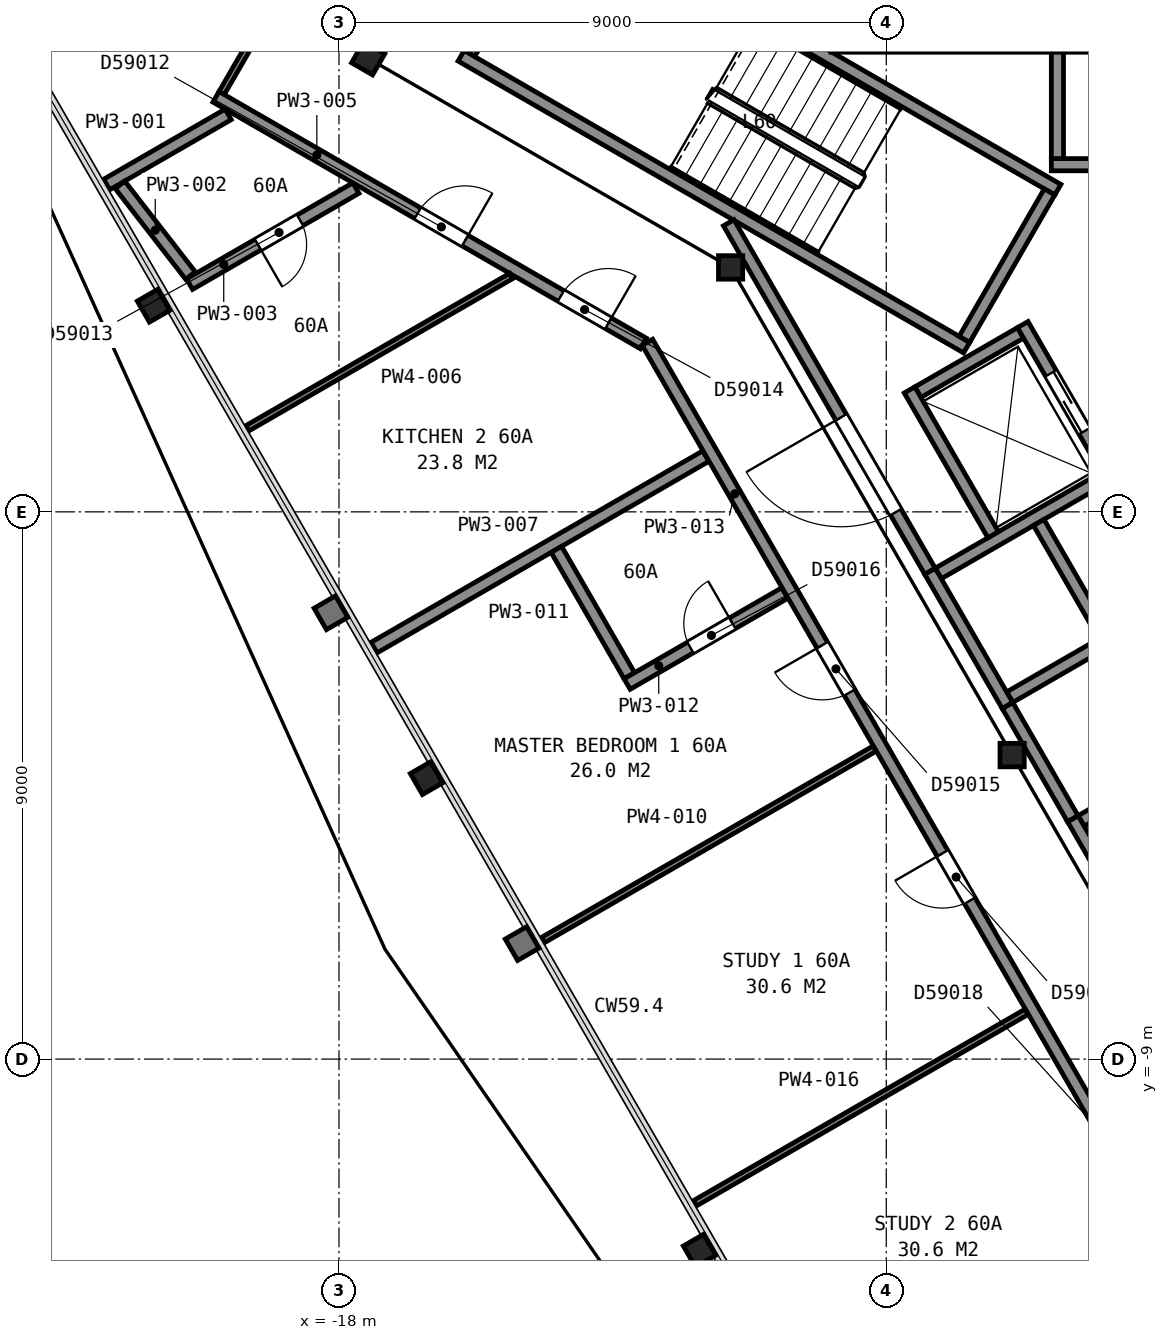
"""IFC4 building model, lengths in metres.
Left out: names, types, materials, properties, quantities, classifications, styles, units other than length and angle.
Written with IfcOpenShell. Run it as: python <this file> out.ifc"""

import sys

from ifc_helpers import new_model, si_unit, direction, frame, frame_2d, origin, origin_2d, place, context, subcontext, project, spatial, rectangle, i_section, extrude, element, fill, save


model = new_model("IFC4")
c1 = context("Model", 3, precision=1e-05, world=origin(), true_north=direction((0.0, 1.0)))
c2 = subcontext(c1, "Body", "Model", "MODEL_VIEW")
j1 = project(units=[si_unit("LENGTHUNIT", "METRE"), si_unit("PLANEANGLEUNIT", "RADIAN")], contexts=[c1])
p1 = place(None, origin())
s1 = spatial("IfcSite", under=j1, at=p1, CompositionType="ELEMENT")
p2 = place(p1, origin())
s2 = spatial("IfcBuilding", under=s1, at=p2, CompositionType="ELEMENT")
p3 = place(p2, frame((0.0, 0.0, 239.7)))
s3 = spatial("IfcBuildingStorey", under=s2, at=p3, CompositionType="ELEMENT", Elevation=239.7)
for number, where, z_axis, x_axis in (
    (1, (-21.05, 3.39, 0.0), (0.0, 0.0, 1.0), (-0.5, 0.866, 0.0)),
    (2, (-16.56, -4.38, 0.0), (0.0, 0.0, 1.0), (-0.5, 0.866, 0.0)),
    (3, (-12.07, -12.15, 0.0), (0.0, 0.0, 1.0), (-0.5, 0.866, 0.0)),
):
    element("IfcColumn", number, at=place(p3, frame(where, z_axis=z_axis, x_axis=x_axis)), inside=s3, PredefinedType="COLUMN", context=c2, shape_type="SweptSolid", body=[
        extrude(i_section(OverallWidth=0.399, OverallDepth=0.386, WebThickness=0.021, FlangeThickness=0.033, FilletRadius=0.015, at=origin_2d()), origin(), (0.0, 0.0, 1.0), 3.665),
    ])
p4 = place(p3, frame((-17.52, 7.46, 0.0), z_axis=(0.0, 0.0, 1.0), x_axis=(0.5, 0.866025403784, 0.0)))
e4 = element("IfcColumn", 4, at=p4, inside=s3, PredefinedType="COLUMN", context=c2, shape_type="SweptSolid", body=[
    extrude(i_section(OverallWidth=0.401, OverallDepth=0.399, WebThickness=0.025, FlangeThickness=0.04, FilletRadius=0.015, at=origin_2d()), origin(), (0.0, 0.0, 1.0), 3.7),
])
for number, where, z_axis, x_axis in (
    (5, (-11.56, 4.02, 0.0), (0.0, 0.0, 1.0), (1.0, 0.0, 0.0)),
    (6, (-6.93, -4.0, 0.0), (0.0, 0.0, 1.0), (1.0, 0.0, 0.0)),
):
    element("IfcColumn", number, at=place(p3, frame(where, z_axis=z_axis, x_axis=x_axis)), inside=s3, PredefinedType="COLUMN", context=c2, shape_type="SweptSolid", body=[
        extrude(i_section(OverallWidth=0.399, OverallDepth=0.386, WebThickness=0.021, FlangeThickness=0.033, FilletRadius=0.015, at=origin_2d()), origin(), (0.0, 0.0, 1.0), 3.7),
    ])
p5 = place(p3, frame((-14.455, 9.962, 0.0), z_axis=(0.0, 0.0, 1.0), x_axis=(-0.500049511043, -0.865996816683, 0.0)))
e7 = element("IfcWall", 7, at=p5, inside=s3, PredefinedType="PARTITIONING", context=c2, shape_type="SweptSolid", body=[
    extrude(rectangle(XDim=2.8, YDim=0.2, at=frame_2d((1.4, 0.0))), origin(), (0.0, 0.0, 1.0), 3.45),
])
p6 = place(p5, frame((0.85, 0.0, 0.0)))
e8 = element("IfcOpeningElement", 8, at=p6, cuts=e7, PredefinedType="OPENING", context=c2, shape_type="SweptSolid", body=[
    extrude(rectangle(XDim=1.1, YDim=2.1, at=frame_2d((0.55, 1.05))), frame((0.0, 0.11, 0.0), z_axis=(0.0, -1.0, 0.0), x_axis=(1.0, 0.0, 0.0)), (0.0, 0.0, 1.0), 0.22),
])
for number, where, z_axis, x_axis in (
    (9, (-7.678, 2.701, 0.0), (0.0, 0.0, 1.0), (-0.866, 0.5, 0.0)),
    (10, (-6.178, 5.299, 0.0), (0.0, 0.0, 1.0), (-0.866, 0.5, 0.0)),
):
    element("IfcWall", number, at=place(p3, frame(where, z_axis=z_axis, x_axis=x_axis)), inside=s3, PredefinedType="PARTITIONING", context=c2, shape_type="SweptSolid", body=[
        extrude(rectangle(XDim=9.6, YDim=0.2, at=frame_2d((4.8, 0.0))), origin(), (0.0, 0.0, 1.0), 3.45),
    ])
p7 = place(p3, frame((-6.315, 5.262, 0.0), z_axis=(0.0, 0.0, 1.0), x_axis=(-0.500049511043, -0.865996816683, 0.0)))
e11 = element("IfcWall", 11, at=p7, inside=s3, PredefinedType="PARTITIONING", context=c2, shape_type="SweptSolid", body=[
    extrude(rectangle(XDim=2.8, YDim=0.2, at=frame_2d((1.4, 0.0))), origin(), (0.0, 0.0, 1.0), 3.45),
])
for number, where, z_axis, x_axis in (
    (12, (-6.285, 5.71, 0.0), (0.0, 0.0, 1.0), (1.0, 0.0, 0.0)),
    (13, (-6.285, 7.66, 0.0), (0.0, 0.0, 1.0), (1.0, 0.0, 0.0)),
):
    element("IfcWall", number, at=place(p3, frame(where, z_axis=z_axis, x_axis=x_axis)), inside=s3, PredefinedType="PARTITIONING", context=c2, shape_type="SweptSolid", body=[
        extrude(rectangle(XDim=2.35, YDim=0.2, at=frame_2d((1.175, 0.0))), origin(), (0.0, 0.0, 1.0), 3.7),
    ])
for number, where, z_axis, x_axis in (
    (14, (-5.795, -5.083, 0.0), (0.0, 0.0, 1.0), (0.866, 0.5, 0.0)),
    (15, (-6.97, -3.048, 0.0), (0.0, 0.0, 1.0), (0.866, 0.5, 0.0)),
):
    element("IfcWall", number, at=place(p3, frame(where, z_axis=z_axis, x_axis=x_axis)), inside=s3, PredefinedType="PARTITIONING", context=c2, shape_type="SweptSolid", body=[
        extrude(rectangle(XDim=1.75, YDim=0.2, at=frame_2d((0.875, 0.0))), origin(), (0.0, 0.0, 1.0), 3.7),
    ])
p8 = place(p3, frame((-8.145, -1.013, 0.0), z_axis=(0.0, 0.0, 1.0), x_axis=(0.866016494683, 0.500015430699, 0.0)))
e16 = element("IfcWall", 16, at=p8, inside=s3, PredefinedType="PARTITIONING", context=c2, shape_type="SweptSolid", body=[
    extrude(rectangle(XDim=3.15, YDim=0.2, at=frame_2d((1.575, 0.0))), origin(), (0.0, 0.0, 1.0), 3.7),
])
p9 = place(p3, frame((-8.48, 1.969, 0.0), z_axis=(0.0, 0.0, 1.0), x_axis=(0.866000020948, 0.500043961785, 0.0)))
e17 = element("IfcWall", 17, at=p9, inside=s3, PredefinedType="PARTITIONING", context=c2, shape_type="SweptSolid", body=[
    extrude(rectangle(XDim=1.95, YDim=0.2, at=frame_2d((0.975, 0.0))), origin(), (0.0, 0.0, 1.0), 3.7),
])
p10 = place(p3, frame((-6.185, 5.81, 0.0), z_axis=(0.0, 0.0, 1.0), x_axis=(0.0, 1.0, 0.0)))
e18 = element("IfcWall", 18, at=p10, inside=s3, PredefinedType="PARTITIONING", context=c2, shape_type="SweptSolid", body=[
    extrude(rectangle(XDim=1.75, YDim=0.2, at=frame_2d((0.875, 0.0))), origin(), (0.0, 0.0, 1.0), 3.7),
])
p11 = place(p3, frame((-5.28, 0.525, 0.0), z_axis=(0.0, 0.0, 1.0), x_axis=(-0.500037662692, 0.866003658127, 0.0)))
e19 = element("IfcWall", 19, at=p11, inside=s3, PredefinedType="PARTITIONING", context=c2, shape_type="SweptSolid", body=[
    extrude(rectangle(XDim=2.95, YDim=0.2, at=frame_2d((1.475, 0.0))), origin(), (0.0, 0.0, 1.0), 3.7),
])
p12 = place(p11, frame((0.925, 0.0, 0.0)))
e20 = element("IfcOpeningElement", 20, at=p12, cuts=e19, PredefinedType="OPENING", context=c2, shape_type="SweptSolid", body=[
    extrude(rectangle(XDim=1.1, YDim=2.1, at=frame_2d((0.55, 1.05))), frame((0.0, 0.11, 0.0), z_axis=(0.0, -1.0, 0.0), x_axis=(1.0, 0.0, 0.0)), (0.0, 0.0, 1.0), 0.22),
])
p13 = place(p3, frame((-5.318, -2.21, 0.0), z_axis=(0.0, 0.0, 1.0), x_axis=(-0.499938297808, 0.866061024631, 0.0)))
e21 = element("IfcWall", 21, at=p13, inside=s3, PredefinedType="PARTITIONING", context=c2, shape_type="SweptSolid", body=[
    extrude(rectangle(XDim=2.35, YDim=0.2, at=frame_2d((1.175, 0.0))), origin(), (0.0, 0.0, 1.0), 3.7),
])
p14 = place(p3, frame((-7.242, -0.376, 0.0), z_axis=(0.0, 0.0, 1.0), x_axis=(-0.499996545922, 0.866027397988, 0.0)))
e22 = element("IfcWall", 22, at=p14, inside=s3, PredefinedType="PARTITIONING", context=c2, shape_type="SweptSolid", body=[
    extrude(rectangle(XDim=2.75, YDim=0.2, at=frame_2d((1.375, 0.0))), origin(), (0.0, 0.0, 1.0), 3.7),
])
for number, where, z_axis, x_axis in (
    (23, (-4.656, -7.255, 0.0), (0.0, 0.0, 1.0), (-0.5, 0.866, 0.0)),
    (24, (-7.006, -3.185, 0.0), (0.0, 0.0, 1.0), (-0.5, 0.866, 0.0)),
):
    element("IfcWall", number, at=place(p3, frame(where, z_axis=z_axis, x_axis=x_axis)), inside=s3, PredefinedType="PARTITIONING", context=c2, shape_type="SweptSolid", body=[
        extrude(rectangle(XDim=2.55, YDim=0.2, at=frame_2d((1.275, 0.0))), origin(), (0.0, 0.0, 1.0), 3.7),
    ])
p15 = place(p3, frame((-11.591, 4.755, 0.0), z_axis=(0.0, 0.0, 1.0), x_axis=(0.500043977787, -0.866000011708, 0.0)))
e25 = element("IfcWall", 25, at=p15, inside=s3, PredefinedType="PARTITIONING", context=c2, shape_type="SweptSolid", body=[
    extrude(rectangle(XDim=6.617, YDim=0.2, at=frame_2d((3.308, 0.0))), origin(), (0.0, 0.0, 1.0), 3.45),
])
p16 = place(p15, frame((3.695, 0.0, 0.0)))
e26 = element("IfcOpeningElement", 26, at=p16, cuts=e25, PredefinedType="OPENING", context=c2, shape_type="SweptSolid", body=[
    extrude(rectangle(XDim=1.8, YDim=2.1, at=frame_2d((0.9, 1.05))), frame((0.0, 0.11, 0.0), z_axis=(0.0, -1.0, 0.0), x_axis=(1.0, 0.0, 0.0)), (0.0, 0.0, 1.0), 0.22),
])
p17 = place(p3, frame((-9.908, 7.66, 0.0), z_axis=(0.0, 0.0, 1.0), x_axis=(1.0, 0.0, 0.0)))
e27 = element("IfcWall", 27, at=p17, inside=s3, PredefinedType="PARTITIONING", context=c2, shape_type="SweptSolid", body=[
    extrude(rectangle(XDim=3.621, YDim=0.2, at=frame_2d((1.811, 0.0))), origin(), (0.0, 0.0, 1.0), 3.45),
])
p18 = place(p3, frame((-7.005, -3.187, 0.0), z_axis=(0.0, 0.0, 1.0), x_axis=(0.499689606989, -0.866204535123, 0.0)))
e28 = element("IfcWall", 28, at=p18, inside=s3, PredefinedType="PARTITIONING", context=c2, shape_type="SweptSolid", body=[
    extrude(rectangle(XDim=2.145, YDim=0.2, at=frame_2d((1.072, 0.0))), origin(), (0.0, 0.0, 1.0), 3.45),
])
p19 = place(p3, frame((-21.821, 5.384, 0.0), z_axis=(0.0, 0.0, 1.0), x_axis=(0.866178541367, 0.499734664072, 0.0)))
e29 = element("IfcWall", 29, at=p19, inside=s3, PredefinedType="PARTITIONING", context=c2, shape_type="SweptSolid", body=[
    extrude(rectangle(XDim=2.308, YDim=0.2, at=frame_2d((1.154, 0.0))), origin(), (0.0, 0.0, 1.0), 2.713),
])
p20 = place(p3, frame((-21.602, 5.378, 0.0), z_axis=(0.0, 0.0, 1.0), x_axis=(0.613269592497, -0.789873665163, 0.0)))
e30 = element("IfcWall", 30, at=p20, inside=s3, PredefinedType="PARTITIONING", context=c2, shape_type="SweptSolid", body=[
    extrude(rectangle(XDim=1.89, YDim=0.2, at=frame_2d((0.945, 0.0))), origin(), (0.0, 0.0, 1.0), 2.713),
])
p21 = place(p3, frame((-20.458, 3.745, 0.0), z_axis=(0.0, 0.0, 1.0), x_axis=(0.865942402911, 0.500143734182, 0.0)))
e31 = element("IfcWall", 31, at=p21, inside=s3, PredefinedType="PARTITIONING", context=c2, shape_type="SweptSolid", body=[
    extrude(rectangle(XDim=3.16, YDim=0.2, at=frame_2d((1.58, 0.0))), origin(), (0.0, 0.0, 1.0), 2.713),
])
p22 = place(p21, frame((1.3, 0.0, 0.0)))
e32 = element("IfcOpeningElement", 32, at=p22, cuts=e31, PredefinedType="OPENING", context=c2, shape_type="SweptSolid", body=[
    extrude(rectangle(XDim=0.8, YDim=2.1, at=frame_2d((0.4, 1.05))), frame((0.0, 0.11, 0.0), z_axis=(0.0, -1.0, 0.0), x_axis=(1.0, 0.0, 0.0)), (0.0, 0.0, 1.0), 0.22),
])
p23 = place(p3, frame((-19.93, 6.888, 0.0), z_axis=(0.0, 0.0, 1.0), x_axis=(0.500420003794, 0.865782778648, 0.0)))
e33 = element("IfcWall", 33, at=p23, inside=s3, PredefinedType="PARTITIONING", context=c2, shape_type="SweptSolid", body=[
    extrude(rectangle(XDim=7.997, YDim=0.1, at=frame_2d((3.999, 0.0))), origin(), (0.0, 0.0, 1.0), 2.713),
])
p24 = place(p23, frame((3.4, 0.0, 0.0)))
e34 = element("IfcOpeningElement", 34, at=p24, cuts=e33, PredefinedType="OPENING", context=c2, shape_type="SweptSolid", body=[
    extrude(rectangle(XDim=1.2, YDim=2.1, at=frame_2d((0.6, 1.05))), frame((0.0, 0.06, 0.0), z_axis=(0.0, -1.0, 0.0), x_axis=(1.0, 0.0, 0.0)), (0.0, 0.0, 1.0), 0.12),
])
p25 = place(p3, frame((-12.995, 2.77, 0.0), z_axis=(0.0, 0.0, 1.0), x_axis=(-0.866100425926, 0.499870035319, 0.0)))
e35 = element("IfcWall", 35, at=p25, inside=s3, PredefinedType="PARTITIONING", context=c2, shape_type="SweptSolid", body=[
    extrude(rectangle(XDim=8.115, YDim=0.2, at=frame_2d((4.058, 0.0))), origin(), (0.0, 0.0, 1.0), 2.713),
])
p26 = place(p25, frame((3.385, 0.0, 0.0)))
e36 = element("IfcOpeningElement", 36, at=p26, cuts=e35, PredefinedType="OPENING", context=c2, shape_type="SweptSolid", body=[
    extrude(rectangle(XDim=0.9, YDim=2.1, at=frame_2d((0.45, 1.05))), frame((0.0, 0.11, 0.0), z_axis=(0.0, -1.0, 0.0), x_axis=(1.0, 0.0, 0.0)), (0.0, 0.0, 1.0), 0.22),
])
p27 = place(p25, frame((0.665, 0.0, 0.0)))
e37 = element("IfcOpeningElement", 37, at=p27, cuts=e35, PredefinedType="OPENING", context=c2, shape_type="SweptSolid", body=[
    extrude(rectangle(XDim=0.9, YDim=2.1, at=frame_2d((0.45, 1.05))), frame((0.0, 0.11, 0.0), z_axis=(0.0, -1.0, 0.0), x_axis=(1.0, 0.0, 0.0)), (0.0, 0.0, 1.0), 0.22),
])
p28 = place(p3, frame((-19.507, 1.375, 0.0), z_axis=(0.0, 0.0, 1.0), x_axis=(0.86604843891, 0.499960099869, 0.0)))
e38 = element("IfcWall", 38, at=p28, inside=s3, PredefinedType="PARTITIONING", context=c2, shape_type="SweptSolid", body=[
    extrude(rectangle(XDim=5.01, YDim=0.1, at=frame_2d((2.505, 0.0))), origin(), (0.0, 0.0, 1.0), 2.713),
])
p29 = place(p3, frame((-17.423, -2.233, 0.0), z_axis=(0.0, 0.0, 1.0), x_axis=(0.866040369504, 0.499974077718, 0.0)))
e39 = element("IfcWall", 39, at=p29, inside=s3, PredefinedType="PARTITIONING", context=c2, shape_type="SweptSolid", body=[
    extrude(rectangle(XDim=6.299, YDim=0.2, at=frame_2d((3.149, 0.0))), origin(), (0.0, 0.0, 1.0), 2.713),
])
p30 = place(p3, frame((-14.646, -7.043, 0.0), z_axis=(0.0, 0.0, 1.0), x_axis=(0.866066838318, 0.499928226415, 0.0)))
e40 = element("IfcWall", 40, at=p30, inside=s3, PredefinedType="PARTITIONING", context=c2, shape_type="SweptSolid", body=[
    extrude(rectangle(XDim=6.299, YDim=0.1, at=frame_2d((3.15, 0.0))), origin(), (0.0, 0.0, 1.0), 2.713),
])
p31 = place(p3, frame((-14.425, -0.618, 0.0), z_axis=(0.0, 0.0, 1.0), x_axis=(0.500133489192, -0.865948320045, 0.0)))
e41 = element("IfcWall", 41, at=p31, inside=s3, PredefinedType="PARTITIONING", context=c2, shape_type="SweptSolid", body=[
    extrude(rectangle(XDim=2.399, YDim=0.2, at=frame_2d((1.2, 0.0))), origin(), (0.0, 0.0, 1.0), 2.713),
])
p32 = place(p3, frame((-13.262, -2.832, 0.0), z_axis=(0.0, 0.0, 1.0), x_axis=(0.86601725921, 0.500014106551, 0.0)))
e42 = element("IfcWall", 42, at=p32, inside=s3, PredefinedType="PARTITIONING", context=c2, shape_type="SweptSolid", body=[
    extrude(rectangle(XDim=2.995, YDim=0.2, at=frame_2d((1.498, 0.0))), origin(), (0.0, 0.0, 1.0), 2.713),
])
p33 = place(p32, frame((1.2, 0.0, 0.0)))
e43 = element("IfcOpeningElement", 43, at=p33, cuts=e42, PredefinedType="OPENING", context=c2, shape_type="SweptSolid", body=[
    extrude(rectangle(XDim=0.8, YDim=2.1, at=frame_2d((0.4, 1.05))), frame((0.0, 0.11, 0.0), z_axis=(0.0, -1.0, 0.0), x_axis=(1.0, 0.0, 0.0)), (0.0, 0.0, 1.0), 0.22),
])
p34 = place(p3, frame((-4.077, -12.543, 0.0), z_axis=(0.0, 0.0, 1.0), x_axis=(-0.499968768298, 0.866043434665, 0.0)))
e44 = element("IfcWall", 44, at=p34, inside=s3, PredefinedType="PARTITIONING", context=c2, shape_type="SweptSolid", body=[
    extrude(rectangle(XDim=17.703, YDim=0.2, at=frame_2d((8.852, 0.0))), origin(), (0.0, 0.0, 1.0), 2.713),
])
p35 = place(p34, frame((11.052, 0.0, 0.0)))
e45 = element("IfcOpeningElement", 45, at=p35, cuts=e44, PredefinedType="OPENING", context=c2, shape_type="SweptSolid", body=[
    extrude(rectangle(XDim=0.9, YDim=2.1, at=frame_2d((0.45, 1.05))), frame((0.0, 0.11, 0.0), z_axis=(0.0, -1.0, 0.0), x_axis=(1.0, 0.0, 0.0)), (0.0, 0.0, 1.0), 0.22),
])
p36 = place(p34, frame((7.098, 0.0, 0.0)))
e46 = element("IfcOpeningElement", 46, at=p36, cuts=e44, PredefinedType="OPENING", context=c2, shape_type="SweptSolid", body=[
    extrude(rectangle(XDim=0.9, YDim=2.1, at=frame_2d((0.45, 1.05))), frame((0.0, 0.11, 0.0), z_axis=(0.0, -1.0, 0.0), x_axis=(1.0, 0.0, 0.0)), (0.0, 0.0, 1.0), 0.22),
])
p37 = place(p34, frame((2.099, 0.0, 0.0)))
e47 = element("IfcOpeningElement", 47, at=p37, cuts=e44, PredefinedType="OPENING", context=c2, shape_type="SweptSolid", body=[
    extrude(rectangle(XDim=0.9, YDim=2.1, at=frame_2d((0.45, 1.05))), frame((0.0, 0.11, 0.0), z_axis=(0.0, -1.0, 0.0), x_axis=(1.0, 0.0, 0.0)), (0.0, 0.0, 1.0), 0.22),
])
p38 = place(p3, frame((-12.147, -11.372, 0.0), z_axis=(0.0, 0.0, 1.0), x_axis=(0.866013897511, 0.50001992892, 0.0)))
e48 = element("IfcWall", 48, at=p38, inside=s3, PredefinedType="PARTITIONING", context=c2, shape_type="SweptSolid", body=[
    extrude(rectangle(XDim=6.299, YDim=0.1, at=frame_2d((3.149, 0.0))), origin(), (0.0, 0.0, 1.0), 2.713),
])
p39 = place(p12, origin())
e49 = element("IfcDoor", 49, at=p39, inside=s3, OperationType="SLIDING_TO_LEFT", PredefinedType="DOOR", context=c2, shape_type="SweptSolid", body=[
    extrude(rectangle(XDim=1.1, YDim=2.1, at=frame_2d((0.55, 1.05))), frame((0.0, 0.025, 0.0), z_axis=(0.0, -1.0, 0.0), x_axis=(1.0, 0.0, 0.0)), (0.0, 0.0, 1.0), 0.05),
])
fill(e20, e49)
p40 = place(p16, origin())
e50 = element("IfcDoor", 50, at=p40, inside=s3, OperationType="DOUBLE_DOOR_SINGLE_SWING", PredefinedType="DOOR", context=c2, shape_type="SweptSolid", body=[
    extrude(rectangle(XDim=1.8, YDim=2.1, at=frame_2d((0.9, 1.05))), frame((0.0, 0.025, 0.0), z_axis=(0.0, -1.0, 0.0), x_axis=(1.0, 0.0, 0.0)), (0.0, 0.0, 1.0), 0.05),
])
fill(e26, e50)
p41 = place(p22, origin())
e51 = element("IfcDoor", 51, at=p41, inside=s3, OperationType="SINGLE_SWING_LEFT", PredefinedType="DOOR", context=c2, shape_type="SweptSolid", body=[
    extrude(rectangle(XDim=0.8, YDim=2.1, at=frame_2d((0.4, 1.05))), frame((0.0, 0.025, 0.0), z_axis=(0.0, -1.0, 0.0), x_axis=(1.0, 0.0, 0.0)), (0.0, 0.0, 1.0), 0.05),
])
fill(e32, e51)
p42 = place(p26, origin())
e52 = element("IfcDoor", 52, at=p42, inside=s3, OperationType="SINGLE_SWING_LEFT", PredefinedType="DOOR", context=c2, shape_type="SweptSolid", body=[
    extrude(rectangle(XDim=0.9, YDim=2.1, at=frame_2d((0.45, 1.05))), frame((0.0, 0.025, 0.0), z_axis=(0.0, -1.0, 0.0), x_axis=(1.0, 0.0, 0.0)), (0.0, 0.0, 1.0), 0.05),
])
fill(e36, e52)
p43 = place(p27, origin())
e53 = element("IfcDoor", 53, at=p43, inside=s3, OperationType="SINGLE_SWING_LEFT", PredefinedType="DOOR", context=c2, shape_type="SweptSolid", body=[
    extrude(rectangle(XDim=0.9, YDim=2.1, at=frame_2d((0.45, 1.05))), frame((0.0, 0.025, 0.0), z_axis=(0.0, -1.0, 0.0), x_axis=(1.0, 0.0, 0.0)), (0.0, 0.0, 1.0), 0.05),
])
fill(e37, e53)
p44 = place(p33, origin())
e54 = element("IfcDoor", 54, at=p44, inside=s3, OperationType="SINGLE_SWING_RIGHT", PredefinedType="DOOR", context=c2, shape_type="SweptSolid", body=[
    extrude(rectangle(XDim=0.8, YDim=2.1, at=frame_2d((0.4, 1.05))), frame((0.0, 0.025, 0.0), z_axis=(0.0, -1.0, 0.0), x_axis=(1.0, 0.0, 0.0)), (0.0, 0.0, 1.0), 0.05),
])
fill(e43, e54)
p45 = place(p35, origin())
e55 = element("IfcDoor", 55, at=p45, inside=s3, OperationType="SINGLE_SWING_RIGHT", PredefinedType="DOOR", context=c2, shape_type="SweptSolid", body=[
    extrude(rectangle(XDim=0.9, YDim=2.1, at=frame_2d((0.45, 1.05))), frame((0.0, 0.025, 0.0), z_axis=(0.0, -1.0, 0.0), x_axis=(1.0, 0.0, 0.0)), (0.0, 0.0, 1.0), 0.05),
])
fill(e45, e55)
p46 = place(p36, origin())
e56 = element("IfcDoor", 56, at=p46, inside=s3, OperationType="SINGLE_SWING_RIGHT", PredefinedType="DOOR", context=c2, shape_type="SweptSolid", body=[
    extrude(rectangle(XDim=0.9, YDim=2.1, at=frame_2d((0.45, 1.05))), frame((0.0, 0.025, 0.0), z_axis=(0.0, -1.0, 0.0), x_axis=(1.0, 0.0, 0.0)), (0.0, 0.0, 1.0), 0.05),
])
fill(e46, e56)
save(model, sys.argv[1])
